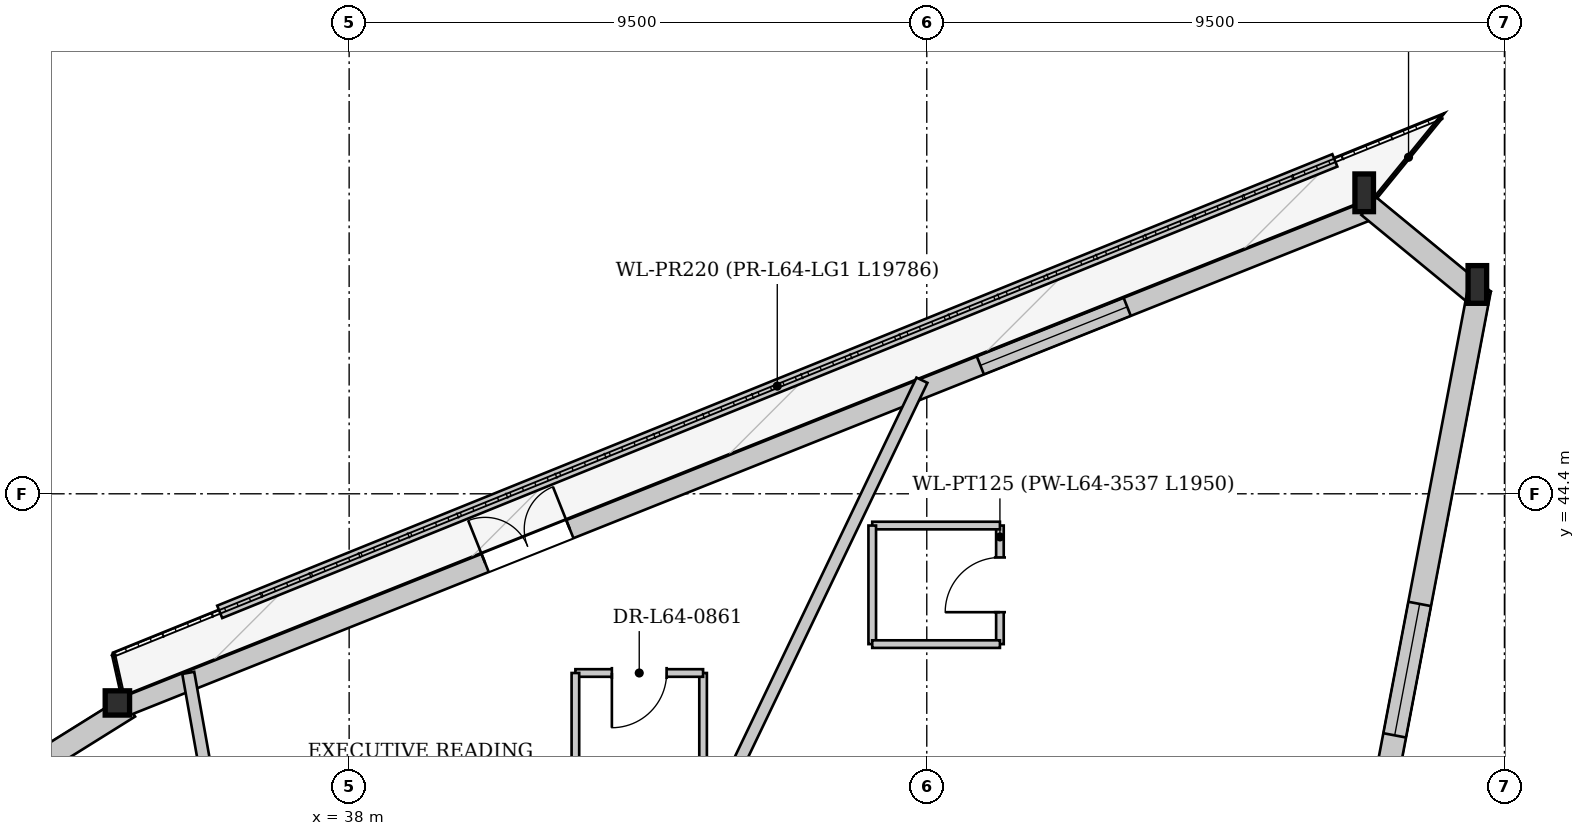
"""IFC4 building model, lengths in metres.
Left out: names, types, materials, properties, quantities, classifications, styles, units other than length and angle.
Written with IfcOpenShell. Run it as: python <this file> out.ifc"""

import sys

from ifc_helpers import new_model, si_unit, direction, frame, frame_2d, origin, origin_2d, place, context, subcontext, project, spatial, rectangle, i_section, extrude, source, transform, mapped, element, fill, save


model = new_model("IFC4")
c1 = context("Model", 3, precision=1e-05, world=origin(), true_north=direction((0.0, 1.0)))
c2 = subcontext(c1, "Body", "Model", "MODEL_VIEW")
j1 = project(units=[si_unit("LENGTHUNIT", "METRE"), si_unit("PLANEANGLEUNIT", "RADIAN")], contexts=[c1])
p1 = place(None, origin())
s1 = spatial("IfcSite", under=j1, at=p1, CompositionType="ELEMENT")
p2 = place(p1, origin())
s2 = spatial("IfcBuilding", under=s1, at=p2, CompositionType="ELEMENT")
p3 = place(p2, frame((0.0, 0.0, 241.7)))
s3 = spatial("IfcBuildingStorey", under=s2, at=p3, CompositionType="ELEMENT", Elevation=241.7)
m1 = source(origin(), c2, "Body", "SweptSolid", [
    extrude(i_section(OverallWidth=0.305, OverallDepth=0.62, WebThickness=0.021, FlangeThickness=0.04, at=origin_2d()), origin(), (0.0, 0.0, 1.0), 3.471),
])
p4 = place(p3, frame((56.776, 47.726, 0.0), z_axis=(-0.127509311173, 0.067306349031, 0.989551024932), x_axis=(-0.466811606986, -0.88435678523, 0.0)))
e1 = element("IfcColumn", 1, at=p4, inside=s3, PredefinedType="COLUMN", context=c2, shape_type="MappedRepresentation", body=[
    mapped(m1, transform((0.0, 0.0, 0.0), x_axis=(1.0, 0.0, 0.0), y_axis=(0.0, 1.0, 0.0), z_axis=(0.0, 0.0, 1.0), scale=1.0)),
])
m2 = source(origin(), c2, "Body", "SweptSolid", [
    extrude(i_section(OverallWidth=0.305, OverallDepth=0.62, WebThickness=0.021, FlangeThickness=0.04, at=origin_2d()), origin(), (0.0, 0.0, 1.0), 3.46),
])
p5 = place(p3, frame((54.889, 49.279, 0.0), z_axis=(-0.112683964141, 0.041206909867, 0.992776064782), x_axis=(-0.343442373818, -0.939173751691, 0.0)))
e2 = element("IfcColumn", 2, at=p5, inside=s3, PredefinedType="COLUMN", context=c2, shape_type="MappedRepresentation", body=[
    mapped(m2, transform((0.0, 0.0, 0.0), x_axis=(1.0, 0.0, 0.0), y_axis=(0.0, 1.0, 0.0), z_axis=(0.0, 0.0, 1.0), scale=1.0)),
])
m3 = source(origin(), c2, "Body", "SweptSolid", [
    extrude(i_section(OverallWidth=0.401, OverallDepth=0.399, WebThickness=0.022, FlangeThickness=0.034, at=origin_2d()), origin(), (0.0, 0.0, 1.0), 3.446),
])
p6 = place(p3, frame((34.279, 41.059, 0.0), z_axis=(-0.052577179651, -0.057112138543, 0.996982368857), x_axis=(0.735712662081, -0.67729379065, 0.0)))
e3 = element("IfcColumn", 3, at=p6, inside=s3, PredefinedType="COLUMN", context=c2, shape_type="MappedRepresentation", body=[
    mapped(m3, transform((0.0, 0.0, 0.0), x_axis=(1.0, 0.0, 0.0), y_axis=(0.0, 1.0, 0.0), z_axis=(0.0, 0.0, 1.0), scale=1.0)),
])
p7 = place(p3, frame((15.555, 29.152, 0.0), z_axis=(0.0, 0.0, 1.0), x_axis=(0.848386889954, 0.52937669476, 0.0)))
e4 = element("IfcWall", 4, at=p7, inside=s3, PredefinedType="SOLIDWALL", context=c2, shape_type="SweptSolid", body=[
    extrude(rectangle(XDim=22.188, YDim=0.38, at=frame_2d((11.094, 0.0))), origin(), (0.0, 0.0, 1.0), 2.872),
])
p8 = place(p7, frame((5.113, 0.0, 0.502)))
e5 = element("IfcOpeningElement", 5, at=p8, cuts=e4, PredefinedType="OPENING", context=c2, shape_type="SweptSolid", body=[
    extrude(rectangle(XDim=2.2, YDim=2.25, at=frame_2d((1.1, 1.125))), frame((0.0, 0.2, 0.0), z_axis=(0.0, -1.0, 0.0), x_axis=(1.0, 0.0, 0.0)), (0.0, 0.0, 1.0), 0.4),
])
p9 = place(p7, frame((14.876, 0.0, 0.502)))
e6 = element("IfcOpeningElement", 6, at=p9, cuts=e4, PredefinedType="OPENING", context=c2, shape_type="SweptSolid", body=[
    extrude(rectangle(XDim=2.2, YDim=2.25, at=frame_2d((1.1, 1.125))), frame((0.0, 0.2, 0.0), z_axis=(0.0, -1.0, 0.0), x_axis=(1.0, 0.0, 0.0)), (0.0, 0.0, 1.0), 0.4),
])
p10 = place(p3, frame((34.338, 40.91, 0.0), z_axis=(0.0, 0.0, 1.0), x_axis=(0.928854869218, 0.370443831005, 0.0)))
e7 = element("IfcWall", 7, at=p10, inside=s3, PredefinedType="SOLIDWALL", context=c2, shape_type="SweptSolid", body=[
    extrude(rectangle(XDim=22.188, YDim=0.32, at=frame_2d((11.094, 0.0))), origin(), (0.0, 0.0, 1.0), 2.872),
])
p11 = place(p10, frame((6.35, 0.0, 0.0)))
e8 = element("IfcOpeningElement", 8, at=p11, cuts=e7, PredefinedType="OPENING", context=c2, shape_type="SweptSolid", body=[
    extrude(rectangle(XDim=1.5, YDim=2.3, at=frame_2d((0.75, 1.15))), frame((0.0, 0.17, 0.0), z_axis=(0.0, -1.0, 0.0), x_axis=(1.0, 0.0, 0.0)), (0.0, 0.0, 1.0), 0.34),
])
p12 = place(p10, frame((15.119, 0.0, 0.402)))
e9 = element("IfcOpeningElement", 9, at=p12, cuts=e7, PredefinedType="OPENING", context=c2, shape_type="SweptSolid", body=[
    extrude(rectangle(XDim=2.6, YDim=2.35, at=frame_2d((1.3, 1.175))), frame((0.0, 0.17, 0.0), z_axis=(0.0, -1.0, 0.0), x_axis=(1.0, 0.0, 0.0)), (0.0, 0.0, 1.0), 0.34),
])
p13 = place(p3, frame((54.768, 49.132, 0.0), z_axis=(0.0, 0.0, 1.0), x_axis=(0.772258846545, -0.635308015008, 0.0)))
e10 = element("IfcWall", 10, at=p13, inside=s3, PredefinedType="SOLIDWALL", context=c2, shape_type="SweptSolid", body=[
    extrude(rectangle(XDim=2.444, YDim=0.38, at=frame_2d((1.222, 0.0))), origin(), (0.0, 0.0, 1.0), 2.872),
])
p14 = place(p3, frame((56.589, 47.761, 0.0), z_axis=(0.0, 0.0, 1.0), x_axis=(-0.186738493237, -0.982409657497, 0.0)))
e11 = element("IfcWall", 11, at=p14, inside=s3, PredefinedType="SOLIDWALL", context=c2, shape_type="SweptSolid", body=[
    extrude(rectangle(XDim=22.732, YDim=0.38, at=frame_2d((11.366, 0.0))), origin(), (0.0, 0.0, 1.0), 2.872),
])
p15 = place(p14, frame((5.265, 0.0, 0.502)))
e12 = element("IfcOpeningElement", 12, at=p15, cuts=e11, PredefinedType="OPENING", context=c2, shape_type="SweptSolid", body=[
    extrude(rectangle(XDim=2.2, YDim=2.25, at=frame_2d((1.1, 1.125))), frame((0.0, 0.2, 0.0), z_axis=(0.0, -1.0, 0.0), x_axis=(1.0, 0.0, 0.0)), (0.0, 0.0, 1.0), 0.4),
])
p16 = place(p14, frame((15.267, 0.0, 0.502)))
e13 = element("IfcOpeningElement", 13, at=p16, cuts=e11, PredefinedType="OPENING", context=c2, shape_type="SweptSolid", body=[
    extrude(rectangle(XDim=2.2, YDim=2.25, at=frame_2d((1.1, 1.125))), frame((0.0, 0.2, 0.0), z_axis=(0.0, -1.0, 0.0), x_axis=(1.0, 0.0, 0.0)), (0.0, 0.0, 1.0), 0.4),
])
p17 = place(p3, frame((54.211, 49.883, 0.0), z_axis=(0.0, 0.0, 1.0), x_axis=(-0.926918098879, -0.375263691251, 0.0)))
e14 = element("IfcWall", 14, at=p17, inside=s3, PredefinedType="PARAPET", context=c2, shape_type="SweptSolid", body=[
    extrude(rectangle(XDim=19.786, YDim=0.22, at=frame_2d((9.893, 0.0))), origin(), (0.0, 0.0, 1.0), 0.3),
])
p18 = place(p3, frame((36.326, 36.0, 0.0), z_axis=(0.0, 0.0, 1.0), x_axis=(-0.175356019098, 0.984505087121, 0.0)))
e15 = element("IfcWall", 15, at=p18, inside=s3, PredefinedType="PARTITIONING", context=c2, shape_type="SweptSolid", body=[
    extrude(rectangle(XDim=5.541, YDim=0.2, at=frame_2d((2.771, 0.0))), origin(), (0.0, 0.0, 1.0), 3.38),
])
p19 = place(p3, frame((41.616, 34.15, 0.0), z_axis=(0.0, 0.0, 1.0), x_axis=(0.43198071356, 0.90188284334, 0.0)))
e16 = element("IfcWall", 16, at=p19, inside=s3, PredefinedType="PARTITIONING", context=c2, shape_type="SweptSolid", body=[
    extrude(rectangle(XDim=13.436, YDim=0.2, at=frame_2d((6.718, 0.0))), origin(), (0.0, 0.0, 1.0), 3.38),
])
p20 = place(p3, frame((48.703, 41.928, 0.0), z_axis=(0.0, 0.0, 1.0), x_axis=(0.0, 1.0, 0.0)))
e17 = element("IfcWall", 17, at=p20, inside=s3, PredefinedType="PARTITIONING", context=c2, shape_type="SweptSolid", body=[
    extrude(rectangle(XDim=1.95, YDim=0.125, at=frame_2d((0.975, 0.0))), origin(), (0.0, 0.0, 1.0), 3.38),
])
p21 = place(p20, frame((0.525, 0.0, 0.0)))
e18 = element("IfcOpeningElement", 18, at=p21, cuts=e17, PredefinedType="OPENING", context=c2, shape_type="SweptSolid", body=[
    extrude(rectangle(XDim=0.9, YDim=2.1, at=frame_2d((0.45, 1.05))), frame((0.0, 0.073, 0.0), z_axis=(0.0, -1.0, 0.0), x_axis=(1.0, 0.0, 0.0)), (0.0, 0.0, 1.0), 0.145),
])
p22 = place(p3, frame((48.703, 43.878, 0.0), z_axis=(0.0, 0.0, 1.0), x_axis=(-1.0, 0.0, 0.0)))
e19 = element("IfcWall", 19, at=p22, inside=s3, PredefinedType="PARTITIONING", context=c2, shape_type="SweptSolid", body=[
    extrude(rectangle(XDim=2.1, YDim=0.125, at=frame_2d((1.05, 0.0))), origin(), (0.0, 0.0, 1.0), 3.38),
])
p23 = place(p3, frame((46.603, 43.878, 0.0), z_axis=(0.0, 0.0, 1.0), x_axis=(0.0, -1.0, 0.0)))
e20 = element("IfcWall", 20, at=p23, inside=s3, PredefinedType="PARTITIONING", context=c2, shape_type="SweptSolid", body=[
    extrude(rectangle(XDim=1.95, YDim=0.125, at=frame_2d((0.975, 0.0))), origin(), (0.0, 0.0, 1.0), 3.38),
])
p24 = place(p3, frame((46.603, 41.928, 0.0), z_axis=(0.0, 0.0, 1.0), x_axis=(1.0, 0.0, 0.0)))
e21 = element("IfcWall", 21, at=p24, inside=s3, PredefinedType="PARTITIONING", context=c2, shape_type="SweptSolid", body=[
    extrude(rectangle(XDim=2.1, YDim=0.125, at=frame_2d((1.05, 0.0))), origin(), (0.0, 0.0, 1.0), 3.065),
])
p25 = place(p3, frame((43.821, 39.503, 0.0), z_axis=(0.0, 0.0, 1.0), x_axis=(0.0, 1.0, 0.0)))
e22 = element("IfcWall", 22, at=p25, inside=s3, PredefinedType="PARTITIONING", context=c2, shape_type="SweptSolid", body=[
    extrude(rectangle(XDim=1.95, YDim=0.125, at=frame_2d((0.975, 0.0))), origin(), (0.0, 0.0, 1.0), 3.38),
])
p26 = place(p3, frame((43.821, 41.453, 0.0), z_axis=(0.0, 0.0, 1.0), x_axis=(-1.0, 0.0, 0.0)))
e23 = element("IfcWall", 23, at=p26, inside=s3, PredefinedType="PARTITIONING", context=c2, shape_type="SweptSolid", body=[
    extrude(rectangle(XDim=2.1, YDim=0.125, at=frame_2d((1.05, 0.0))), origin(), (0.0, 0.0, 1.0), 3.38),
])
p27 = place(p26, frame((0.6, 0.0, 0.0)))
e24 = element("IfcOpeningElement", 24, at=p27, cuts=e23, PredefinedType="OPENING", context=c2, shape_type="SweptSolid", body=[
    extrude(rectangle(XDim=0.9, YDim=2.1, at=frame_2d((0.45, 1.05))), frame((0.0, 0.073, 0.0), z_axis=(0.0, -1.0, 0.0), x_axis=(1.0, 0.0, 0.0)), (0.0, 0.0, 1.0), 0.145),
])
p28 = place(p3, frame((41.721, 41.453, 0.0), z_axis=(0.0, 0.0, 1.0), x_axis=(0.0, -1.0, 0.0)))
e25 = element("IfcWall", 25, at=p28, inside=s3, PredefinedType="PARTITIONING", context=c2, shape_type="SweptSolid", body=[
    extrude(rectangle(XDim=1.95, YDim=0.125, at=frame_2d((0.975, 0.0))), origin(), (0.0, 0.0, 1.0), 3.38),
])
m4 = source(origin(), c2, "Body", "SweptSolid", [
    extrude(rectangle(XDim=1.5, YDim=2.3, at=frame_2d((0.75, 1.15))), frame((0.0, 0.025, 0.0), z_axis=(0.0, -1.0, 0.0), x_axis=(1.0, 0.0, 0.0)), (0.0, 0.0, 1.0), 0.05),
])
p29 = place(p11, origin())
e26 = element("IfcDoor", 26, at=p29, inside=s3, OperationType="DOUBLE_DOOR_SINGLE_SWING", PredefinedType="DOOR", context=c2, shape_type="MappedRepresentation", body=[
    mapped(m4, transform((0.0, 0.0, 0.0), x_axis=(1.0, 0.0, 0.0), y_axis=(0.0, 1.0, 0.0), z_axis=(0.0, 0.0, 1.0), scale=1.0)),
])
fill(e8, e26)
m5 = source(origin(), c2, "Body", "SweptSolid", [
    extrude(rectangle(XDim=2.6, YDim=2.35, at=frame_2d((1.3, 1.175))), frame((0.0, 0.03, 0.0), z_axis=(0.0, -1.0, 0.0), x_axis=(1.0, 0.0, 0.0)), (0.0, 0.0, 1.0), 0.06),
])
p30 = place(p12, origin())
e27 = element("IfcWindow", 27, at=p30, inside=s3, PartitioningType="SINGLE_PANEL", PredefinedType="WINDOW", context=c2, shape_type="MappedRepresentation", body=[
    mapped(m5, transform((0.0, 0.0, 0.0), x_axis=(1.0, 0.0, 0.0), y_axis=(0.0, 1.0, 0.0), z_axis=(0.0, 0.0, 1.0), scale=1.0)),
])
fill(e9, e27)
m6 = source(origin(), c2, "Body", "SweptSolid", [
    extrude(rectangle(XDim=2.2, YDim=2.25, at=frame_2d((1.1, 1.125))), frame((0.0, 0.03, 0.0), z_axis=(0.0, -1.0, 0.0), x_axis=(1.0, 0.0, 0.0)), (0.0, 0.0, 1.0), 0.06),
])
p31 = place(p15, origin())
e28 = element("IfcWindow", 28, at=p31, inside=s3, PartitioningType="SINGLE_PANEL", PredefinedType="WINDOW", context=c2, shape_type="MappedRepresentation", body=[
    mapped(m6, transform((0.0, 0.0, 0.0), x_axis=(1.0, 0.0, 0.0), y_axis=(0.0, 1.0, 0.0), z_axis=(0.0, 0.0, 1.0), scale=1.0)),
])
fill(e12, e28)
m7 = source(origin(), c2, "Body", "SweptSolid", [
    extrude(rectangle(XDim=0.9, YDim=2.1, at=frame_2d((0.45, 1.05))), frame((0.0, 0.025, 0.0), z_axis=(0.0, -1.0, 0.0), x_axis=(1.0, 0.0, 0.0)), (0.0, 0.0, 1.0), 0.05),
])
p32 = place(p21, origin())
e29 = element("IfcDoor", 29, at=p32, inside=s3, OperationType="SINGLE_SWING_LEFT", PredefinedType="DOOR", context=c2, shape_type="MappedRepresentation", body=[
    mapped(m7, transform((0.0, 0.0, 0.0), x_axis=(1.0, 0.0, 0.0), y_axis=(0.0, 1.0, 0.0), z_axis=(0.0, 0.0, 1.0), scale=1.0)),
])
fill(e18, e29)
p33 = place(p27, origin())
e30 = element("IfcDoor", 30, at=p33, inside=s3, OperationType="SINGLE_SWING_RIGHT", PredefinedType="DOOR", context=c2, shape_type="MappedRepresentation", body=[
    mapped(m7, transform((0.0, 0.0, 0.0), x_axis=(1.0, 0.0, 0.0), y_axis=(0.0, 1.0, 0.0), z_axis=(0.0, 0.0, 1.0), scale=1.0)),
])
fill(e24, e30)
save(model, sys.argv[1])
